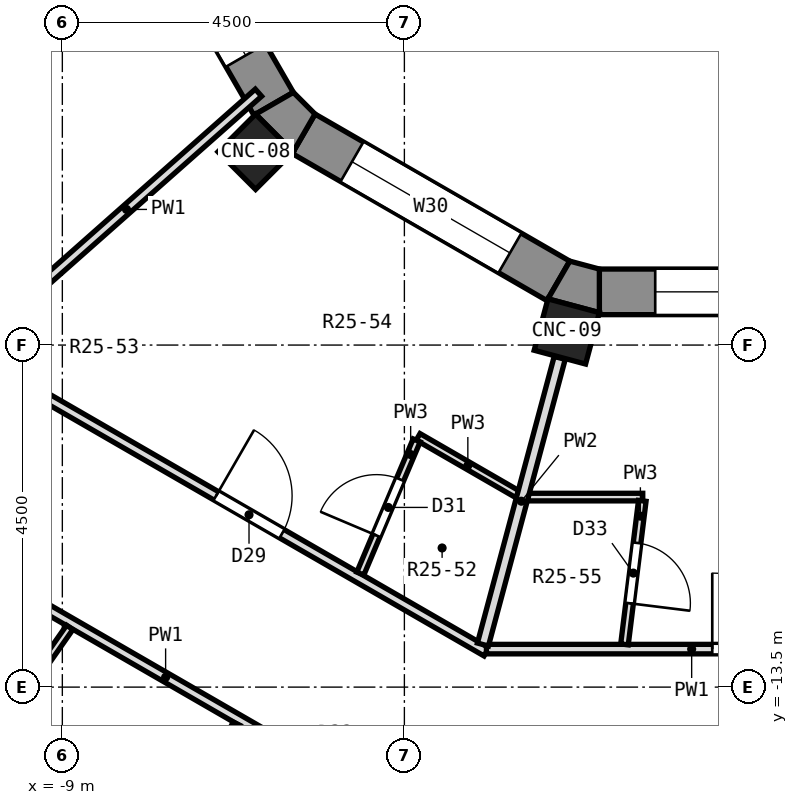
"""IFC4 building model, lengths in metres.
Left out: names, types, materials, properties, quantities, classifications, styles, units other than length and angle.
Written with IfcOpenShell. Run it as: python <this file> out.ifc"""

import sys

from ifc_helpers import new_model, si_unit, direction, frame, frame_2d, origin, origin_2d, place, context, subcontext, project, spatial, polyline, rectangle, outline, extrude, element, fill, save


model = new_model("IFC4")
c1 = context("Model", 3, precision=1e-05, world=origin(), true_north=direction((0.0, 1.0)))
c2 = subcontext(c1, "Body", "Model", "MODEL_VIEW")
j1 = project(units=[si_unit("LENGTHUNIT", "METRE"), si_unit("PLANEANGLEUNIT", "RADIAN")], contexts=[c1])
p1 = place(None, origin())
s1 = spatial("IfcSite", under=j1, at=p1, CompositionType="ELEMENT")
p2 = place(p1, origin())
s2 = spatial("IfcBuilding", under=s1, at=p2, CompositionType="ELEMENT")
p3 = place(p2, frame((0.0, 0.0, 160.8)))
s3 = spatial("IfcBuildingStorey", under=s2, at=p3, CompositionType="ELEMENT", Elevation=160.8)
for number, where, z_axis, x_axis in (
    (1, (-6.458, -6.458, 0.0), (0.0, 0.0, 1.0), (-0.707, -0.707, 0.0)),
    (2, (-2.364, -8.821, 0.0), (0.0, 0.0, 1.0), (-0.259, -0.966, 0.0)),
):
    element("IfcColumn", number, at=place(p3, frame(where, z_axis=z_axis, x_axis=x_axis)), inside=s3, PredefinedType="COLUMN", context=c2, shape_type="SweptSolid", body=[
        extrude(rectangle(XDim=0.7, YDim=0.7, at=origin_2d()), origin(), (0.0, 0.0, 1.0), 3.3),
    ])
p4 = place(p3, frame((-8.156, -2.474, 0.0), z_axis=(0.0, 0.0, 1.0), x_axis=(0.500033728941, -0.866005929495, 0.0)))
e3 = element("IfcWall", 3, at=p4, inside=s3, PredefinedType="SOLIDWALL", context=c2, shape_type="SweptSolid", body=[
    extrude(rectangle(XDim=3.87, YDim=0.6, at=frame_2d((1.935, 0.0))), origin(), (0.0, 0.0, 1.0), 2.85),
])
p5 = place(p4, frame((0.735, 0.0, 0.9)))
e4 = element("IfcOpeningElement", 4, at=p5, cuts=e3, PredefinedType="OPENING", context=c2, shape_type="SweptSolid", body=[
    extrude(rectangle(XDim=2.4, YDim=1.8, at=frame_2d((1.2, 0.9))), frame((0.0, 0.312, 0.0), z_axis=(0.0, -1.0, 0.0), x_axis=(1.0, 0.0, 0.0)), (0.0, 0.0, 1.0), 0.624),
])
p6 = place(p3, frame((-5.826, -6.22, 0.0), z_axis=(0.0, 0.0, 1.0), x_axis=(0.866005929495, -0.500033728941, 0.0)))
e5 = element("IfcWall", 5, at=p6, inside=s3, PredefinedType="SOLIDWALL", context=c2, shape_type="SweptSolid", body=[
    extrude(rectangle(XDim=3.87, YDim=0.6, at=frame_2d((1.935, 0.0))), origin(), (0.0, 0.0, 1.0), 2.85),
])
p7 = place(p6, frame((0.735, 0.0, 0.9)))
e6 = element("IfcOpeningElement", 6, at=p7, cuts=e5, PredefinedType="OPENING", context=c2, shape_type="SweptSolid", body=[
    extrude(rectangle(XDim=2.4, YDim=1.8, at=frame_2d((1.2, 0.9))), frame((0.0, 0.312, 0.0), z_axis=(0.0, -1.0, 0.0), x_axis=(1.0, 0.0, 0.0)), (0.0, 0.0, 1.0), 0.624),
])
p8 = place(p3, frame((-1.935, -8.3, 0.0), z_axis=(0.0, 0.0, 1.0), x_axis=(1.0, 0.0, 0.0)))
e7 = element("IfcWall", 7, at=p8, inside=s3, PredefinedType="SOLIDWALL", context=c2, shape_type="SweptSolid", body=[
    extrude(rectangle(XDim=3.87, YDim=0.6, at=frame_2d((1.935, 0.0))), origin(), (0.0, 0.0, 1.0), 2.85),
])
p9 = place(p8, frame((0.735, 0.0, 0.9)))
e8 = element("IfcOpeningElement", 8, at=p9, cuts=e7, PredefinedType="OPENING", context=c2, shape_type="SweptSolid", body=[
    extrude(rectangle(XDim=2.4, YDim=1.8, at=frame_2d((1.2, 0.9))), frame((0.0, 0.312, 0.0), z_axis=(0.0, -1.0, 0.0), x_axis=(1.0, 0.0, 0.0)), (0.0, 0.0, 1.0), 0.624),
])
p10 = place(p3, origin())
e9 = element("IfcWall", 9, at=p10, inside=s3, PredefinedType="SOLIDWALL", context=c2, shape_type="SweptSolid", body=[
    extrude(outline(polyline([(-6.458, -5.962), (-5.962, -6.458), (-5.676, -5.961), (-5.961, -5.676), (-6.458, -5.962)])), origin(), (0.0, 0.0, 1.0), 2.85),
])
p11 = place(p3, origin())
e10 = element("IfcWall", 10, at=p11, inside=s3, PredefinedType="SOLIDWALL", context=c2, shape_type="SweptSolid", body=[
    extrude(outline(polyline([(-1.935, -8.573), (-1.935, -8.0), (-2.324, -7.896), (-2.611, -8.392), (-1.935, -8.573)])), origin(), (0.0, 0.0, 1.0), 2.85),
])
p12 = place(p3, frame((-11.22, -11.305, 0.0), z_axis=(0.0, 0.0, 1.0), x_axis=(0.866074891173, -0.499914275531, 0.0)))
e11 = element("IfcWall", 11, at=p12, inside=s3, PredefinedType="PARTITIONING", context=c2, shape_type="SweptSolid", body=[
    extrude(rectangle(XDim=8.263, YDim=0.125, at=frame_2d((4.132, 0.0))), origin(), (0.0, 0.0, 1.0), 2.85),
])
p13 = place(p12, frame((0.877, 0.0, 0.0)))
e12 = element("IfcOpeningElement", 12, at=p13, cuts=e11, PredefinedType="OPENING", context=c2, shape_type="SweptSolid", body=[
    extrude(rectangle(XDim=0.9, YDim=2.1, at=frame_2d((0.45, 1.05))), frame((0.0, 0.074, 0.0), z_axis=(0.0, -1.0, 0.0), x_axis=(1.0, 0.0, 0.0)), (0.0, 0.0, 1.0), 0.149),
])
p14 = place(p12, frame((6.265, 0.0, 0.0)))
e13 = element("IfcOpeningElement", 13, at=p14, cuts=e11, PredefinedType="OPENING", context=c2, shape_type="SweptSolid", body=[
    extrude(rectangle(XDim=0.9, YDim=2.1, at=frame_2d((0.45, 1.05))), frame((0.0, 0.074, 0.0), z_axis=(0.0, -1.0, 0.0), x_axis=(1.0, 0.0, 0.0)), (0.0, 0.0, 1.0), 0.149),
])
p15 = place(p3, frame((-9.463, -9.548, 0.0), z_axis=(0.0, 0.0, 1.0), x_axis=(0.866077207726, -0.499910262205, 0.0)))
e14 = element("IfcWall", 14, at=p15, inside=s3, PredefinedType="PARTITIONING", context=c2, shape_type="SweptSolid", body=[
    extrude(rectangle(XDim=6.977, YDim=0.125, at=frame_2d((3.488, 0.0))), origin(), (0.0, 0.0, 1.0), 2.85),
])
p16 = place(p15, frame((2.87, 0.0, 0.0)))
e15 = element("IfcOpeningElement", 15, at=p16, cuts=e14, PredefinedType="OPENING", context=c2, shape_type="SweptSolid", body=[
    extrude(rectangle(XDim=1.0, YDim=2.1, at=frame_2d((0.5, 1.05))), frame((0.0, 0.074, 0.0), z_axis=(0.0, -1.0, 0.0), x_axis=(1.0, 0.0, 0.0)), (0.0, 0.0, 1.0), 0.149),
])
p17 = place(p3, frame((-4.319, -10.208, 0.0), z_axis=(0.0, 0.0, 1.0), x_axis=(0.866104780601, -0.499862490111, 0.0)))
e16 = element("IfcWall", 16, at=p17, inside=s3, PredefinedType="PARTITIONING", context=c2, shape_type="SweptSolid", body=[
    extrude(rectangle(XDim=1.509, YDim=0.1, at=frame_2d((0.755, 0.0))), origin(), (0.0, 0.0, 1.0), 2.85),
])
p18 = place(p3, frame((-3.42, -13.0, 0.0), z_axis=(0.0, 0.0, 1.0), x_axis=(1.0, 0.0, 0.0)))
e17 = element("IfcWall", 17, at=p18, inside=s3, PredefinedType="PARTITIONING", context=c2, shape_type="SweptSolid", body=[
    extrude(rectangle(XDim=6.99, YDim=0.125, at=frame_2d((3.495, 0.0))), origin(), (0.0, 0.0, 1.0), 2.85),
])
p19 = place(p18, frame((2.971, 0.0, 0.0)))
e18 = element("IfcOpeningElement", 18, at=p19, cuts=e17, PredefinedType="OPENING", context=c2, shape_type="SweptSolid", body=[
    extrude(rectangle(XDim=1.0, YDim=2.1, at=frame_2d((0.5, 1.05))), frame((0.0, 0.074, 0.0), z_axis=(0.0, -1.0, 0.0), x_axis=(1.0, 0.0, 0.0)), (0.0, 0.0, 1.0), 0.149),
])
p20 = place(p3, frame((-2.872, -11.0, 0.0), z_axis=(0.0, 0.0, 1.0), x_axis=(1.0, 0.0, 0.0)))
e19 = element("IfcWall", 19, at=p20, inside=s3, PredefinedType="PARTITIONING", context=c2, shape_type="SweptSolid", body=[
    extrude(rectangle(XDim=1.508, YDim=0.1, at=frame_2d((0.754, 0.0))), origin(), (0.0, 0.0, 1.0), 2.85),
])
p21 = place(p3, frame((-9.891, -8.751, 0.0), z_axis=(0.0, 0.0, 1.0), x_axis=(0.748982485585, 0.662589794886, 0.0)))
e20 = element("IfcWall", 20, at=p21, inside=s3, PredefinedType="PARTITIONING", context=c2, shape_type="SweptSolid", body=[
    extrude(rectangle(XDim=4.635, YDim=0.125, at=frame_2d((2.317, 0.0))), origin(), (0.0, 0.0, 1.0), 2.85),
])
p22 = place(p3, frame((-13.617, -19.447, 0.0), z_axis=(0.0, 0.0, 1.0), x_axis=(0.573585951544, 0.819145381597, 0.0)))
e21 = element("IfcWall", 21, at=p22, inside=s3, PredefinedType="PARTITIONING", context=c2, shape_type="SweptSolid", body=[
    extrude(rectangle(XDim=8.218, YDim=0.1, at=frame_2d((4.109, 0.0))), origin(), (0.0, 0.0, 1.0), 2.85),
])
p23 = place(p3, frame((-8.202, -17.094, 0.0), z_axis=(0.0, 0.0, 1.0), x_axis=(0.432471241397, 0.901647727976, 0.0)))
e22 = element("IfcWall", 22, at=p23, inside=s3, PredefinedType="PARTITIONING", context=c2, shape_type="SweptSolid", body=[
    extrude(rectangle(XDim=3.452, YDim=0.1, at=frame_2d((1.726, 0.0))), origin(), (0.0, 0.0, 1.0), 2.85),
])
p24 = place(p23, frame((1.307, 0.0, 0.0)))
e23 = element("IfcOpeningElement", 23, at=p24, cuts=e22, PredefinedType="OPENING", context=c2, shape_type="SweptSolid", body=[
    extrude(rectangle(XDim=0.9, YDim=2.1, at=frame_2d((0.45, 1.05))), frame((0.0, 0.062, 0.0), z_axis=(0.0, -1.0, 0.0), x_axis=(1.0, 0.0, 0.0)), (0.0, 0.0, 1.0), 0.124),
])
p25 = place(p3, frame((-5.08, -12.006, 0.0), z_axis=(0.0, 0.0, 1.0), x_axis=(0.389593941569, 0.920986732094, 0.0)))
e24 = element("IfcWall", 24, at=p25, inside=s3, PredefinedType="PARTITIONING", context=c2, shape_type="SweptSolid", body=[
    extrude(rectangle(XDim=1.903, YDim=0.1, at=frame_2d((0.951, 0.0))), origin(), (0.0, 0.0, 1.0), 2.85),
])
p26 = place(p25, frame((0.545, 0.0, 0.0)))
e25 = element("IfcOpeningElement", 25, at=p26, cuts=e24, PredefinedType="OPENING", context=c2, shape_type="SweptSolid", body=[
    extrude(rectangle(XDim=0.8, YDim=2.1, at=frame_2d((0.4, 1.05))), frame((0.0, 0.062, 0.0), z_axis=(0.0, -1.0, 0.0), x_axis=(1.0, 0.0, 0.0)), (0.0, 0.0, 1.0), 0.124),
])
p27 = place(p3, frame((-3.467, -12.94, 0.0), z_axis=(0.0, 0.0, 1.0), x_axis=(0.258732959093, 0.965948888854, 0.0)))
e26 = element("IfcWall", 26, at=p27, inside=s3, PredefinedType="PARTITIONING", context=c2, shape_type="SweptSolid", body=[
    extrude(rectangle(XDim=3.904, YDim=0.15, at=frame_2d((1.952, 0.0))), origin(), (0.0, 0.0, 1.0), 2.85),
])
p28 = place(p3, frame((-1.604, -12.938, 0.0), z_axis=(0.0, 0.0, 1.0), x_axis=(0.123039852559, 0.992401730491, 0.0)))
e27 = element("IfcWall", 27, at=p28, inside=s3, PredefinedType="PARTITIONING", context=c2, shape_type="SweptSolid", body=[
    extrude(rectangle(XDim=1.903, YDim=0.1, at=frame_2d((0.951, 0.0))), origin(), (0.0, 0.0, 1.0), 2.85),
])
p29 = place(p28, frame((0.545, 0.0, 0.0)))
e28 = element("IfcOpeningElement", 28, at=p29, cuts=e27, PredefinedType="OPENING", context=c2, shape_type="SweptSolid", body=[
    extrude(rectangle(XDim=0.8, YDim=2.1, at=frame_2d((0.4, 1.05))), frame((0.0, 0.062, 0.0), z_axis=(0.0, -1.0, 0.0), x_axis=(1.0, 0.0, 0.0)), (0.0, 0.0, 1.0), 0.124),
])
p30 = place(p5, origin())
e29 = element("IfcWindow", 29, at=p30, inside=s3, PartitioningType="SINGLE_PANEL", PredefinedType="WINDOW", context=c2, shape_type="SweptSolid", body=[
    extrude(rectangle(XDim=2.4, YDim=1.8, at=frame_2d((1.2, 0.9))), frame((0.0, -0.12, 0.0), z_axis=(0.0, -1.0, 0.0), x_axis=(1.0, 0.0, 0.0)), (0.0, 0.0, 1.0), 0.06),
])
fill(e4, e29)
p31 = place(p7, origin())
e30 = element("IfcWindow", 30, at=p31, inside=s3, PartitioningType="SINGLE_PANEL", PredefinedType="WINDOW", context=c2, shape_type="SweptSolid", body=[
    extrude(rectangle(XDim=2.4, YDim=1.8, at=frame_2d((1.2, 0.9))), frame((0.0, -0.12, 0.0), z_axis=(0.0, -1.0, 0.0), x_axis=(1.0, 0.0, 0.0)), (0.0, 0.0, 1.0), 0.06),
])
fill(e6, e30)
p32 = place(p9, origin())
e31 = element("IfcWindow", 31, at=p32, inside=s3, PartitioningType="SINGLE_PANEL", PredefinedType="WINDOW", context=c2, shape_type="SweptSolid", body=[
    extrude(rectangle(XDim=2.4, YDim=1.8, at=frame_2d((1.2, 0.9))), frame((0.0, -0.12, 0.0), z_axis=(0.0, -1.0, 0.0), x_axis=(1.0, 0.0, 0.0)), (0.0, 0.0, 1.0), 0.06),
])
fill(e8, e31)
p33 = place(p16, origin())
e32 = element("IfcDoor", 32, at=p33, inside=s3, OperationType="SINGLE_SWING_LEFT", PredefinedType="DOOR", context=c2, shape_type="SweptSolid", body=[
    extrude(rectangle(XDim=1.0, YDim=2.1, at=frame_2d((0.5, 1.05))), frame((0.0, 0.025, 0.0), z_axis=(0.0, -1.0, 0.0), x_axis=(1.0, 0.0, 0.0)), (0.0, 0.0, 1.0), 0.05),
])
fill(e15, e32)
p34 = place(p26, origin())
e33 = element("IfcDoor", 33, at=p34, inside=s3, OperationType="SINGLE_SWING_LEFT", PredefinedType="DOOR", context=c2, shape_type="SweptSolid", body=[
    extrude(rectangle(XDim=0.8, YDim=2.1, at=frame_2d((0.4, 1.05))), frame((0.0, 0.025, 0.0), z_axis=(0.0, -1.0, 0.0), x_axis=(1.0, 0.0, 0.0)), (0.0, 0.0, 1.0), 0.05),
])
fill(e25, e33)
p35 = place(p29, frame((0.8, 0.0, 0.0), z_axis=(0.0, 0.0, 1.0), x_axis=(-1.0, 0.0, 0.0)))
e34 = element("IfcDoor", 34, at=p35, inside=s3, OperationType="SINGLE_SWING_RIGHT", PredefinedType="DOOR", context=c2, shape_type="SweptSolid", body=[
    extrude(rectangle(XDim=0.8, YDim=2.1, at=frame_2d((0.4, 1.05))), frame((0.0, 0.025, 0.0), z_axis=(0.0, -1.0, 0.0), x_axis=(1.0, 0.0, 0.0)), (0.0, 0.0, 1.0), 0.05),
])
fill(e28, e34)
p36 = place(p19, origin())
e35 = element("IfcDoor", 35, at=p36, inside=s3, OperationType="SINGLE_SWING_LEFT", PredefinedType="DOOR", context=c2, shape_type="SweptSolid", body=[
    extrude(rectangle(XDim=1.0, YDim=2.1, at=frame_2d((0.5, 1.05))), frame((0.0, 0.025, 0.0), z_axis=(0.0, -1.0, 0.0), x_axis=(1.0, 0.0, 0.0)), (0.0, 0.0, 1.0), 0.05),
])
fill(e18, e35)
save(model, sys.argv[1])
